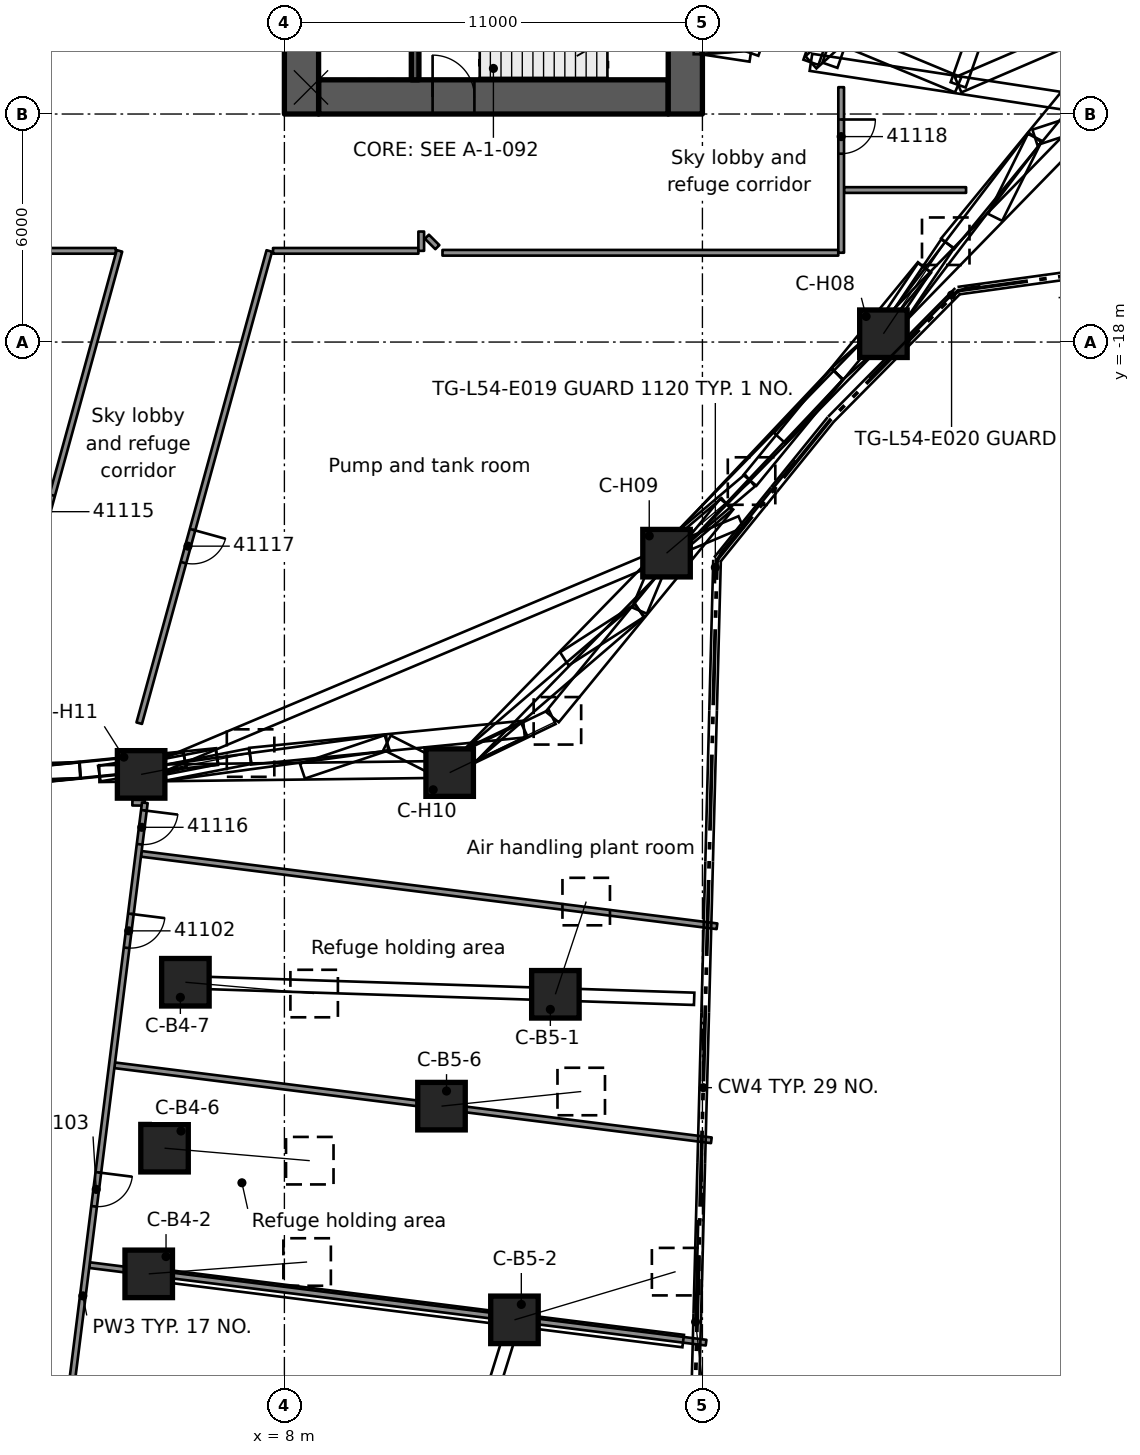
"""IFC4 building model, lengths in metres.
Left out: names, types, materials, properties, quantities, classifications, styles, units other than length and angle.
Written with IfcOpenShell. Run it as: python <this file> out.ifc"""

import sys

from ifc_helpers import new_model, si_unit, direction, frame, frame_2d, origin, origin_2d, place, context, subcontext, project, spatial, rectangle, extrude, element, fill, save


model = new_model("IFC4")
c1 = context("Model", 3, precision=1e-05, world=origin(), true_north=direction((0.0, 1.0)))
c2 = subcontext(c1, "Body", "Model", "MODEL_VIEW")
j1 = project(units=[si_unit("LENGTHUNIT", "METRE"), si_unit("PLANEANGLEUNIT", "RADIAN")], contexts=[c1])
p1 = place(None, origin())
s1 = spatial("IfcSite", under=j1, at=p1, CompositionType="ELEMENT")
p2 = place(p1, origin())
s2 = spatial("IfcBuilding", under=s1, at=p2, CompositionType="ELEMENT")
p3 = place(p2, frame((0.0, 0.0, 206.1)))
s3 = spatial("IfcBuildingStorey", under=s2, at=p3, CompositionType="ELEMENT", Elevation=206.1)
p4 = place(p3, frame((8.9, -11.55, 0.0), z_axis=(0.0, 0.0, 1.0), x_axis=(1.0, 0.0, 0.0)))
e1 = element("IfcWall", 1, at=p4, inside=s3, PredefinedType="SHEAR", context=c2, shape_type="SweptSolid", body=[
    extrude(rectangle(XDim=9.2, YDim=0.9, at=frame_2d((4.6, 0.0))), origin(), (0.0, 0.0, 1.0), 4.4),
])
p5 = place(p4, frame((3.0, 0.0, 0.0)))
e2 = element("IfcOpeningElement", 2, at=p5, cuts=e1, PredefinedType="OPENING", context=c2, shape_type="SweptSolid", body=[
    extrude(rectangle(XDim=1.1, YDim=2.1, at=frame_2d((0.55, 1.05))), frame((0.0, 0.46, 0.0), z_axis=(0.0, -1.0, 0.0), x_axis=(1.0, 0.0, 0.0)), (0.0, 0.0, 1.0), 0.92),
])
p6 = place(p3, frame((8.45, -12.0, 0.0), z_axis=(0.0, 0.0, 1.0), x_axis=(0.0, 1.0, 0.0)))
e3 = element("IfcWall", 3, at=p6, inside=s3, PredefinedType="SHEAR", context=c2, shape_type="SweptSolid", body=[
    extrude(rectangle(XDim=24.0, YDim=0.9, at=frame_2d((12.0, 0.0))), origin(), (0.0, 0.0, 1.0), 4.4),
])
p7 = place(p6, frame((12.6, 0.0, 0.0)))
e4 = element("IfcOpeningElement", 4, at=p7, cuts=e3, PredefinedType="OPENING", context=c2, shape_type="SweptSolid", body=[
    extrude(rectangle(XDim=1.8, YDim=2.1, at=frame_2d((0.9, 1.05))), frame((0.0, 0.46, 0.0), z_axis=(0.0, -1.0, 0.0), x_axis=(1.0, 0.0, 0.0)), (0.0, 0.0, 1.0), 0.92),
])
p8 = place(p6, frame((16.3, 0.0, 0.0)))
e5 = element("IfcOpeningElement", 5, at=p8, cuts=e3, PredefinedType="OPENING", context=c2, shape_type="SweptSolid", body=[
    extrude(rectangle(XDim=1.8, YDim=2.1, at=frame_2d((0.9, 1.05))), frame((0.0, 0.46, 0.0), z_axis=(0.0, -1.0, 0.0), x_axis=(1.0, 0.0, 0.0)), (0.0, 0.0, 1.0), 0.92),
])
p9 = place(p6, frame((9.6, 0.0, 0.0)))
e6 = element("IfcOpeningElement", 6, at=p9, cuts=e3, PredefinedType="OPENING", context=c2, shape_type="SweptSolid", body=[
    extrude(rectangle(XDim=1.8, YDim=2.1, at=frame_2d((0.9, 1.05))), frame((0.0, 0.46, 0.0), z_axis=(0.0, -1.0, 0.0), x_axis=(1.0, 0.0, 0.0)), (0.0, 0.0, 1.0), 0.92),
])
p10 = place(p6, frame((3.25, 0.0, 0.0)))
e7 = element("IfcOpeningElement", 7, at=p10, cuts=e3, PredefinedType="OPENING", context=c2, shape_type="SweptSolid", body=[
    extrude(rectangle(XDim=1.1, YDim=2.1, at=frame_2d((0.55, 1.05))), frame((0.0, 0.46, 0.0), z_axis=(0.0, -1.0, 0.0), x_axis=(1.0, 0.0, 0.0)), (0.0, 0.0, 1.0), 0.92),
])
p11 = place(p3, frame((18.55, -12.0, 0.0), z_axis=(0.0, 0.0, 1.0), x_axis=(0.0, 1.0, 0.0)))
e8 = element("IfcWall", 8, at=p11, inside=s3, PredefinedType="SHEAR", context=c2, shape_type="SweptSolid", body=[
    extrude(rectangle(XDim=24.0, YDim=0.9, at=frame_2d((12.0, 0.0))), origin(), (0.0, 0.0, 1.0), 4.4),
])
p12 = place(p11, frame((16.3, 0.0, 0.0)))
e9 = element("IfcOpeningElement", 9, at=p12, cuts=e8, PredefinedType="OPENING", context=c2, shape_type="SweptSolid", body=[
    extrude(rectangle(XDim=1.8, YDim=2.1, at=frame_2d((0.9, 1.05))), frame((0.0, 0.46, 0.0), z_axis=(0.0, -1.0, 0.0), x_axis=(1.0, 0.0, 0.0)), (0.0, 0.0, 1.0), 0.92),
])
p13 = place(p11, frame((12.1, 0.0, 0.0)))
e10 = element("IfcOpeningElement", 10, at=p13, cuts=e8, PredefinedType="OPENING", context=c2, shape_type="SweptSolid", body=[
    extrude(rectangle(XDim=1.8, YDim=2.1, at=frame_2d((0.9, 1.05))), frame((0.0, 0.46, 0.0), z_axis=(0.0, -1.0, 0.0), x_axis=(1.0, 0.0, 0.0)), (0.0, 0.0, 1.0), 0.92),
])
p14 = place(p11, frame((7.9, 0.0, 0.0)))
e11 = element("IfcOpeningElement", 11, at=p14, cuts=e8, PredefinedType="OPENING", context=c2, shape_type="SweptSolid", body=[
    extrude(rectangle(XDim=1.8, YDim=2.1, at=frame_2d((0.9, 1.05))), frame((0.0, 0.46, 0.0), z_axis=(0.0, -1.0, 0.0), x_axis=(1.0, 0.0, 0.0)), (0.0, 0.0, 1.0), 0.92),
])
p15 = place(p3, frame((4.43, -42.518, 0.483), z_axis=(0.770496575996, 0.057678925968, 0.634829243086), x_axis=(-0.074650542849, 0.997209755494, 0.0)))
e12 = element("IfcColumn", 12, at=p15, inside=s3, PredefinedType="COLUMN", context=c2, shape_type="SweptSolid", body=[
    extrude(rectangle(XDim=1.25, YDim=1.25, at=origin_2d()), origin(), (0.0, 0.0, 1.0), 5.409),
])
p16 = place(p3, frame((4.846, -39.211, 0.463), z_axis=(0.738555428714, -0.063594552405, 0.671186718896), x_axis=(0.085789226433, 0.996313308467, 0.0)))
e13 = element("IfcColumn", 13, at=p16, inside=s3, PredefinedType="COLUMN", context=c2, shape_type="SweptSolid", body=[
    extrude(rectangle(XDim=1.25, YDim=1.25, at=origin_2d()), origin(), (0.0, 0.0, 1.0), 5.175),
])
p17 = place(p3, frame((5.395, -34.845, 0.433), z_axis=(0.690841886067, -0.060586191204, 0.720462908061), x_axis=(0.087363751065, 0.996176477839, 0.0)))
e14 = element("IfcColumn", 14, at=p17, inside=s3, PredefinedType="COLUMN", context=c2, shape_type="SweptSolid", body=[
    extrude(rectangle(XDim=1.25, YDim=1.25, at=origin_2d()), origin(), (0.0, 0.0, 1.0), 4.904),
])
p18 = place(p3, frame((15.131, -35.162, 0.358), z_axis=(0.180452482411, 0.543096224539, 0.820050847498), x_axis=(-0.948986687834, 0.315316137098, 0.0)))
e15 = element("IfcColumn", 15, at=p18, inside=s3, PredefinedType="COLUMN", context=c2, shape_type="SweptSolid", body=[
    extrude(rectangle(XDim=1.25, YDim=1.25, at=origin_2d()), origin(), (0.0, 0.0, 1.0), 4.493),
])
p19 = place(p3, frame((14.054, -43.728, 0.495), z_axis=(0.759016145733, 0.22694892988, 0.610236571948), x_axis=(-0.286472377914, 0.958088501492, 0.0)))
e16 = element("IfcColumn", 16, at=p19, inside=s3, PredefinedType="COLUMN", context=c2, shape_type="SweptSolid", body=[
    extrude(rectangle(XDim=1.25, YDim=1.25, at=origin_2d()), origin(), (0.0, 0.0, 1.0), 5.587),
])
p20 = place(p3, frame((12.134, -38.105, 0.454), z_axis=(0.723108894722, 0.075714941038, 0.6865717545), x_axis=(-0.104138210679, 0.994562835157, 0.0)))
e17 = element("IfcColumn", 17, at=p20, inside=s3, PredefinedType="COLUMN", context=c2, shape_type="SweptSolid", body=[
    extrude(rectangle(XDim=1.25, YDim=1.25, at=origin_2d()), origin(), (0.0, 0.0, 1.0), 5.085),
])
p21 = place(p3, frame((23.763, -17.781, 0.394), z_axis=(0.352426283358, 0.523026204983, 0.776040787394), x_axis=(-0.829301622557, 0.558801233735, 0.0)))
e18 = element("IfcColumn", 18, at=p21, inside=s3, PredefinedType="COLUMN", context=c2, shape_type="SweptSolid", body=[
    extrude(rectangle(XDim=1.25, YDim=1.25, at=origin_2d()), origin(), (0.0, 0.0, 1.0), 4.654),
])
p22 = place(p3, frame((18.056, -23.555, 0.394), z_axis=(0.480742322781, 0.407867599836, 0.776228600408), x_axis=(-0.646945190778, 0.762536504129, 0.0)))
e19 = element("IfcColumn", 19, at=p22, inside=s3, PredefinedType="COLUMN", context=c2, shape_type="SweptSolid", body=[
    extrude(rectangle(XDim=1.25, YDim=1.25, at=origin_2d()), origin(), (0.0, 0.0, 1.0), 4.653),
])
p23 = place(p3, frame((12.349, -29.329, 0.413), z_axis=(0.5954182598, 0.286274556016, 0.750682339258), x_axis=(-0.433313832209, 0.901243098623, 0.0)))
e20 = element("IfcColumn", 20, at=p23, inside=s3, PredefinedType="COLUMN", context=c2, shape_type="SweptSolid", body=[
    extrude(rectangle(XDim=1.25, YDim=1.25, at=origin_2d()), origin(), (0.0, 0.0, 1.0), 4.761),
])
p24 = place(p3, frame((4.23, -29.376, 0.394), z_axis=(0.618915614767, 0.120561844769, 0.776149665582), x_axis=(-0.191201472119, 0.981550812266, 0.0)))
e21 = element("IfcColumn", 21, at=p24, inside=s3, PredefinedType="COLUMN", context=c2, shape_type="SweptSolid", body=[
    extrude(rectangle(XDim=1.25, YDim=1.25, at=origin_2d()), origin(), (0.0, 0.0, 1.0), 4.654),
])
p25 = place(p3, frame((11.44, -6.975, 0.0), z_axis=(0.0, 0.0, 1.0), x_axis=(0.0, -1.0, 0.0)))
e22 = element("IfcWall", 22, at=p25, inside=s3, PredefinedType="SOLIDWALL", context=c2, shape_type="SweptSolid", body=[
    extrude(rectangle(XDim=4.125, YDim=0.2, at=frame_2d((2.062, 0.0))), origin(), (0.0, 0.0, 1.0), 3.99),
])
p26 = place(p25, frame((2.1, 0.0, 0.0)))
e23 = element("IfcOpeningElement", 23, at=p26, cuts=e22, PredefinedType="OPENING", context=c2, shape_type="SweptSolid", body=[
    extrude(rectangle(XDim=1.1, YDim=2.1, at=frame_2d((0.55, 1.05))), frame((0.0, 0.11, 0.0), z_axis=(0.0, -1.0, 0.0), x_axis=(1.0, 0.0, 0.0)), (0.0, 0.0, 1.0), 0.22),
])
p27 = place(p3, frame((11.75, -15.228, 0.0), z_axis=(0.0, 0.0, 1.0), x_axis=(0.707106781187, -0.707106781187, 0.0)))
e24 = element("IfcWall", 24, at=p27, inside=s3, PredefinedType="PARTITIONING", context=c2, shape_type="SweptSolid", body=[
    extrude(rectangle(XDim=0.389, YDim=0.15, at=frame_2d((0.194, 0.0))), origin(), (0.0, 0.0, 1.0), 3.98),
])
p28 = place(p3, frame((2.872, -42.288, 0.0), z_axis=(0.0, 0.0, 1.0), x_axis=(0.992188726877, -0.124745862686, 0.0)))
e25 = element("IfcWall", 25, at=p28, inside=s3, PredefinedType="PARTITIONING", context=c2, shape_type="SweptSolid", body=[
    extrude(rectangle(XDim=16.352, YDim=0.15, at=frame_2d((8.176, 0.0))), origin(), (0.0, 0.0, 1.0), 3.98),
])
p29 = place(p3, frame((3.533, -37.03, 0.0), z_axis=(0.0, 0.0, 1.0), x_axis=(0.992191245848, -0.124725825964, 0.0)))
e26 = element("IfcWall", 26, at=p29, inside=s3, PredefinedType="PARTITIONING", context=c2, shape_type="SweptSolid", body=[
    extrude(rectangle(XDim=15.826, YDim=0.15, at=frame_2d((7.913, 0.0))), origin(), (0.0, 0.0, 1.0), 3.98),
])
p30 = place(p3, frame((4.232, -31.467, 0.0), z_axis=(0.0, 0.0, 1.0), x_axis=(0.992187839052, -0.124752923961, 0.0)))
e27 = element("IfcWall", 27, at=p30, inside=s3, PredefinedType="PARTITIONING", context=c2, shape_type="SweptSolid", body=[
    extrude(rectangle(XDim=15.271, YDim=0.15, at=frame_2d((7.635, 0.0))), origin(), (0.0, 0.0, 1.0), 3.98),
])
p31 = place(p3, frame((4.0, -30.119, 0.0), z_axis=(0.0, 0.0, 1.0), x_axis=(0.999918931432, -0.012733050063, 0.0)))
e28 = element("IfcWall", 28, at=p31, inside=s3, PredefinedType="PARTITIONING", context=c2, shape_type="SweptSolid", body=[
    extrude(rectangle(XDim=0.326, YDim=0.15, at=frame_2d((0.163, 0.0))), origin(), (0.0, 0.0, 1.0), 3.98),
])
p32 = place(p3, frame((12.16, -15.651, 0.0), z_axis=(0.0, 0.0, 1.0), x_axis=(1.0, 0.0, 0.0)))
e29 = element("IfcWall", 29, at=p32, inside=s3, PredefinedType="PARTITIONING", context=c2, shape_type="SweptSolid", body=[
    extrude(rectangle(XDim=10.415, YDim=0.15, at=frame_2d((5.208, 0.0))), origin(), (0.0, 0.0, 1.0), 3.98),
])
p33 = place(p3, frame((-6.595, -15.6, 0.0), z_axis=(0.0, 0.0, 1.0), x_axis=(1.0, 0.0, 0.0)))
e30 = element("IfcWall", 30, at=p33, inside=s3, PredefinedType="PARTITIONING", context=c2, shape_type="SweptSolid", body=[
    extrude(rectangle(XDim=10.157, YDim=0.15, at=frame_2d((5.079, 0.0))), origin(), (0.0, 0.0, 1.0), 3.98),
])
p34 = place(p3, frame((7.701, -15.6, 0.0), z_axis=(0.0, 0.0, 1.0), x_axis=(1.0, 0.0, 0.0)))
e31 = element("IfcWall", 31, at=p34, inside=s3, PredefinedType="PARTITIONING", context=c2, shape_type="SweptSolid", body=[
    extrude(rectangle(XDim=3.825, YDim=0.15, at=frame_2d((1.913, 0.0))), origin(), (0.0, 0.0, 1.0), 3.98),
])
p35 = place(p3, frame((22.726, -14.0, 0.0), z_axis=(0.0, 0.0, 1.0), x_axis=(1.0, 0.0, 0.0)))
e32 = element("IfcWall", 32, at=p35, inside=s3, PredefinedType="PARTITIONING", context=c2, shape_type="SweptSolid", body=[
    extrude(rectangle(XDim=3.212, YDim=0.15, at=frame_2d((1.606, 0.0))), origin(), (0.0, 0.0, 1.0), 3.98),
])
p36 = place(p3, frame((7.603, -15.603, 0.0), z_axis=(0.0, 0.0, 1.0), x_axis=(-0.265604225534, -0.964082151779, 0.0)))
e33 = element("IfcWall", 33, at=p36, inside=s3, PredefinedType="PARTITIONING", context=c2, shape_type="SweptSolid", body=[
    extrude(rectangle(XDim=12.888, YDim=0.15, at=frame_2d((6.444, 0.0))), origin(), (0.0, 0.0, 1.0), 3.98),
])
p37 = place(p36, frame((7.607, 0.0, 0.0)))
e34 = element("IfcOpeningElement", 34, at=p37, cuts=e33, PredefinedType="OPENING", context=c2, shape_type="SweptSolid", body=[
    extrude(rectangle(XDim=0.9, YDim=2.1, at=frame_2d((0.45, 1.05))), frame((0.0, 0.085, 0.0), z_axis=(0.0, -1.0, 0.0), x_axis=(1.0, 0.0, 0.0)), (0.0, 0.0, 1.0), 0.17),
])
p38 = place(p3, frame((0.43, -27.332, 0.0), z_axis=(0.0, 0.0, 1.0), x_axis=(0.265459601419, 0.964121983991, 0.0)))
e35 = element("IfcWall", 35, at=p38, inside=s3, PredefinedType="PARTITIONING", context=c2, shape_type="SweptSolid", body=[
    extrude(rectangle(XDim=12.167, YDim=0.15, at=frame_2d((6.084, 0.0))), origin(), (0.0, 0.0, 1.0), 3.98),
])
p39 = place(p38, frame((4.6, 0.0, 0.0)))
e36 = element("IfcOpeningElement", 36, at=p39, cuts=e35, PredefinedType="OPENING", context=c2, shape_type="SweptSolid", body=[
    extrude(rectangle(XDim=0.9, YDim=2.1, at=frame_2d((0.45, 1.05))), frame((0.0, 0.085, 0.0), z_axis=(0.0, -1.0, 0.0), x_axis=(1.0, 0.0, 0.0)), (0.0, 0.0, 1.0), 0.17),
])
p40 = place(p3, frame((4.328, -30.123, 0.0), z_axis=(0.0, 0.0, 1.0), x_axis=(-0.124803349917, -0.992181497434, 0.0)))
e37 = element("IfcWall", 37, at=p40, inside=s3, PredefinedType="PARTITIONING", context=c2, shape_type="SweptSolid", body=[
    extrude(rectangle(XDim=26.153, YDim=0.15, at=frame_2d((13.076, 0.0))), origin(), (0.0, 0.0, 1.0), 3.98),
])
p41 = place(p40, frame((2.946, 0.0, 0.0)))
e38 = element("IfcOpeningElement", 38, at=p41, cuts=e37, PredefinedType="OPENING", context=c2, shape_type="SweptSolid", body=[
    extrude(rectangle(XDim=0.9, YDim=2.1, at=frame_2d((0.45, 1.05))), frame((0.0, 0.085, 0.0), z_axis=(0.0, -1.0, 0.0), x_axis=(1.0, 0.0, 0.0)), (0.0, 0.0, 1.0), 0.17),
])
p42 = place(p40, frame((9.803, 0.0, 0.0)))
e39 = element("IfcOpeningElement", 39, at=p42, cuts=e37, PredefinedType="OPENING", context=c2, shape_type="SweptSolid", body=[
    extrude(rectangle(XDim=0.9, YDim=2.1, at=frame_2d((0.45, 1.05))), frame((0.0, 0.085, 0.0), z_axis=(0.0, -1.0, 0.0), x_axis=(1.0, 0.0, 0.0)), (0.0, 0.0, 1.0), 0.17),
])
p43 = place(p40, frame((16.102, 0.0, 0.0)))
e40 = element("IfcOpeningElement", 40, at=p43, cuts=e37, PredefinedType="OPENING", context=c2, shape_type="SweptSolid", body=[
    extrude(rectangle(XDim=0.9, YDim=2.1, at=frame_2d((0.45, 1.05))), frame((0.0, 0.085, 0.0), z_axis=(0.0, -1.0, 0.0), x_axis=(1.0, 0.0, 0.0)), (0.0, 0.0, 1.0), 0.17),
])
p44 = place(p40, frame((23.052, 0.0, 0.0)))
e41 = element("IfcOpeningElement", 41, at=p44, cuts=e37, PredefinedType="OPENING", context=c2, shape_type="SweptSolid", body=[
    extrude(rectangle(XDim=0.9, YDim=2.1, at=frame_2d((0.45, 1.05))), frame((0.0, 0.085, 0.0), z_axis=(0.0, -1.0, 0.0), x_axis=(1.0, 0.0, 0.0)), (0.0, 0.0, 1.0), 0.17),
])
p45 = place(p40, frame((0.2, 0.0, 0.0)))
e42 = element("IfcOpeningElement", 42, at=p45, cuts=e37, PredefinedType="OPENING", context=c2, shape_type="SweptSolid", body=[
    extrude(rectangle(XDim=0.9, YDim=2.1, at=frame_2d((0.45, 1.05))), frame((0.0, 0.085, 0.0), z_axis=(0.0, -1.0, 0.0), x_axis=(1.0, 0.0, 0.0)), (0.0, 0.0, 1.0), 0.17),
])
p46 = place(p3, frame((22.651, -11.294, 0.0), z_axis=(0.0, 0.0, 1.0), x_axis=(0.0, -1.0, 0.0)))
e43 = element("IfcWall", 43, at=p46, inside=s3, PredefinedType="PARTITIONING", context=c2, shape_type="SweptSolid", body=[
    extrude(rectangle(XDim=4.356, YDim=0.15, at=frame_2d((2.178, 0.0))), origin(), (0.0, 0.0, 1.0), 3.98),
])
p47 = place(p46, frame((0.85, 0.0, 0.0)))
e44 = element("IfcOpeningElement", 44, at=p47, cuts=e43, PredefinedType="OPENING", context=c2, shape_type="SweptSolid", body=[
    extrude(rectangle(XDim=0.9, YDim=2.1, at=frame_2d((0.45, 1.05))), frame((0.0, 0.085, 0.0), z_axis=(0.0, -1.0, 0.0), x_axis=(1.0, 0.0, 0.0)), (0.0, 0.0, 1.0), 0.17),
])
p48 = place(p3, frame((11.601, -15.6, 0.0), z_axis=(0.0, 0.0, 1.0), x_axis=(0.0, 1.0, 0.0)))
e45 = element("IfcWall", 45, at=p48, inside=s3, PredefinedType="PARTITIONING", context=c2, shape_type="SweptSolid", body=[
    extrude(rectangle(XDim=0.508, YDim=0.15, at=frame_2d((0.254, 0.0))), origin(), (0.0, 0.0, 1.0), 3.98),
])
p49 = place(p5, origin())
e46 = element("IfcDoor", 46, at=p49, inside=s3, OperationType="SINGLE_SWING_LEFT", PredefinedType="DOOR", context=c2, shape_type="SweptSolid", body=[
    extrude(rectangle(XDim=1.1, YDim=2.1, at=frame_2d((0.55, 1.05))), frame((0.0, 0.025, 0.0), z_axis=(0.0, -1.0, 0.0), x_axis=(1.0, 0.0, 0.0)), (0.0, 0.0, 1.0), 0.05),
])
fill(e2, e46)
p50 = place(p41, origin())
e47 = element("IfcDoor", 47, at=p50, inside=s3, OperationType="SINGLE_SWING_LEFT", PredefinedType="DOOR", context=c2, shape_type="SweptSolid", body=[
    extrude(rectangle(XDim=0.9, YDim=2.1, at=frame_2d((0.45, 1.05))), frame((0.0, 0.025, 0.0), z_axis=(0.0, -1.0, 0.0), x_axis=(1.0, 0.0, 0.0)), (0.0, 0.0, 1.0), 0.05),
])
fill(e38, e47)
p51 = place(p42, origin())
e48 = element("IfcDoor", 48, at=p51, inside=s3, OperationType="SINGLE_SWING_LEFT", PredefinedType="DOOR", context=c2, shape_type="SweptSolid", body=[
    extrude(rectangle(XDim=0.9, YDim=2.1, at=frame_2d((0.45, 1.05))), frame((0.0, 0.025, 0.0), z_axis=(0.0, -1.0, 0.0), x_axis=(1.0, 0.0, 0.0)), (0.0, 0.0, 1.0), 0.05),
])
fill(e39, e48)
p52 = place(p39, origin())
e49 = element("IfcDoor", 49, at=p52, inside=s3, OperationType="SINGLE_SWING_LEFT", PredefinedType="DOOR", context=c2, shape_type="SweptSolid", body=[
    extrude(rectangle(XDim=0.9, YDim=2.1, at=frame_2d((0.45, 1.05))), frame((0.0, 0.025, 0.0), z_axis=(0.0, -1.0, 0.0), x_axis=(1.0, 0.0, 0.0)), (0.0, 0.0, 1.0), 0.05),
])
fill(e36, e49)
p53 = place(p45, origin())
e50 = element("IfcDoor", 50, at=p53, inside=s3, OperationType="SINGLE_SWING_LEFT", PredefinedType="DOOR", context=c2, shape_type="SweptSolid", body=[
    extrude(rectangle(XDim=0.9, YDim=2.1, at=frame_2d((0.45, 1.05))), frame((0.0, 0.025, 0.0), z_axis=(0.0, -1.0, 0.0), x_axis=(1.0, 0.0, 0.0)), (0.0, 0.0, 1.0), 0.05),
])
fill(e42, e50)
p54 = place(p37, origin())
e51 = element("IfcDoor", 51, at=p54, inside=s3, OperationType="SINGLE_SWING_RIGHT", PredefinedType="DOOR", context=c2, shape_type="SweptSolid", body=[
    extrude(rectangle(XDim=0.9, YDim=2.1, at=frame_2d((0.45, 1.05))), frame((0.0, 0.025, 0.0), z_axis=(0.0, -1.0, 0.0), x_axis=(1.0, 0.0, 0.0)), (0.0, 0.0, 1.0), 0.05),
])
fill(e34, e51)
p55 = place(p47, origin())
e52 = element("IfcDoor", 52, at=p55, inside=s3, OperationType="SINGLE_SWING_LEFT", PredefinedType="DOOR", context=c2, shape_type="SweptSolid", body=[
    extrude(rectangle(XDim=0.9, YDim=2.1, at=frame_2d((0.45, 1.05))), frame((0.0, 0.025, 0.0), z_axis=(0.0, -1.0, 0.0), x_axis=(1.0, 0.0, 0.0)), (0.0, 0.0, 1.0), 0.05),
])
fill(e44, e52)
save(model, sys.argv[1])
